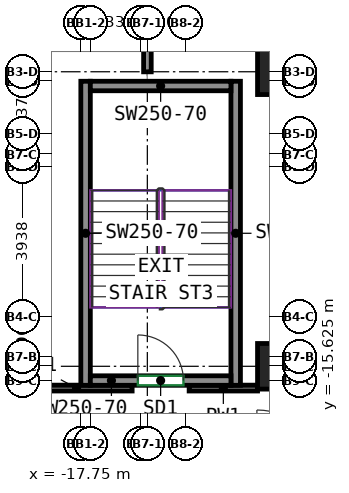
"""IFC4 building model, lengths in metres.
Left out: names, types, materials, properties, quantities, classifications, styles, units other than length and angle.
Written with IfcOpenShell. Run it as: python <this file> out.ifc"""

import sys

from ifc_helpers import new_model, si_unit, direction, frame, frame_2d, origin, origin_2d, place, context, subcontext, project, spatial, rectangle, extrude, source, transform, mapped, element, fill, save


model = new_model("IFC4")
c1 = context("Model", 3, precision=1e-05, world=origin(), true_north=direction((0.0, 1.0)))
c2 = subcontext(c1, "Body", "Model", "MODEL_VIEW")
j1 = project(units=[si_unit("LENGTHUNIT", "METRE"), si_unit("PLANEANGLEUNIT", "RADIAN")], contexts=[c1])
p1 = place(None, origin())
s1 = spatial("IfcSite", under=j1, at=p1, CompositionType="ELEMENT")
p2 = place(p1, origin())
s2 = spatial("IfcBuilding", under=s1, at=p2, CompositionType="ELEMENT")
p3 = place(p2, frame((0.0, 0.0, 100.6)))
s3 = spatial("IfcBuildingStorey", under=s2, at=p3, CompositionType="ELEMENT", Elevation=100.6)
m1 = source(origin(), c2, "Body", "SweptSolid", [
    extrude(rectangle(XDim=1.2, YDim=1.2, at=origin_2d()), origin(), (0.0, 0.0, 1.0), 3.72),
])
for number, where, z_axis, x_axis in (
    (1, (-12.5, -15.25, 0.0), (0.0, 0.0, 1.0), (1.0, 0.0, 0.0)),
    (2, (-12.5, -7.5, 0.0), (0.0, 0.0, 1.0), (1.0, 0.0, 0.0)),
):
    element("IfcColumn", number, at=place(p3, frame(where, z_axis=z_axis, x_axis=x_axis)), inside=s3, PredefinedType="COLUMN", context=c2, shape_type="MappedRepresentation", body=[
        mapped(m1, transform((0.0, 0.0, 0.0))),
    ])
m2 = source(origin(), c2, "Body", "SweptSolid", [
    extrude(rectangle(XDim=8.0, YDim=0.25, at=frame_2d((4.0, 0.0))), origin(), (0.0, 0.0, 1.0), 3.72),
])
for number, where, z_axis, x_axis in (
    (3, (-17.625, -15.75, 0.0), (0.0, 0.0, 1.0), (0.0, 1.0, 0.0)),
    (4, (-13.675, -15.75, 0.0), (0.0, 0.0, 1.0), (0.0, 1.0, 0.0)),
):
    element("IfcWall", number, at=place(p3, frame(where, z_axis=z_axis, x_axis=x_axis)), inside=s3, PredefinedType="SHEAR", context=c2, shape_type="MappedRepresentation", body=[
        mapped(m2, transform((0.0, 0.0, 0.0))),
    ])
m3 = source(origin(), c2, "Body", "SweptSolid", [
    extrude(rectangle(XDim=3.7, YDim=0.25, at=frame_2d((1.85, 0.0))), origin(), (0.0, 0.0, 1.0), 3.72),
])
p4 = place(p3, frame((-17.5, -15.625, 0.0), z_axis=(0.0, 0.0, 1.0), x_axis=(1.0, 0.0, 0.0)))
e5 = element("IfcWall", 5, at=p4, inside=s3, PredefinedType="SHEAR", context=c2, shape_type="MappedRepresentation", body=[
    mapped(m3, transform((0.0, 0.0, 0.0))),
])
p5 = place(p4, frame((1.25, 0.0, 0.0)))
e6 = element("IfcOpeningElement", 6, at=p5, cuts=e5, PredefinedType="OPENING", context=c2, shape_type="SweptSolid", body=[
    extrude(rectangle(XDim=1.2, YDim=2.1, at=frame_2d((0.6, 1.05))), frame((0.0, 0.135, 0.0), z_axis=(0.0, -1.0, 0.0), x_axis=(1.0, 0.0, 0.0)), (0.0, 0.0, 1.0), 0.27),
])
p6 = place(p3, frame((-17.5, -7.875, 0.0), z_axis=(0.0, 0.0, 1.0), x_axis=(1.0, 0.0, 0.0)))
e7 = element("IfcWall", 7, at=p6, inside=s3, PredefinedType="SHEAR", context=c2, shape_type="MappedRepresentation", body=[
    mapped(m3, transform((0.0, 0.0, 0.0))),
])
p7 = place(p3, frame((-14.9, -15.825, 0.0), z_axis=(0.0, 0.0, 1.0), x_axis=(1.0, 0.0, 0.0)))
e8 = element("IfcWall", 8, at=p7, inside=s3, PredefinedType="PARTITIONING", context=c2, shape_type="SweptSolid", body=[
    extrude(rectangle(XDim=1.8, YDim=0.15, at=frame_2d((0.9, 0.0))), origin(), (0.0, 0.0, 1.0), 3.72),
])
p8 = place(p3, frame((-19.325, -15.825, 0.0), z_axis=(0.0, 0.0, 1.0), x_axis=(1.0, 0.0, 0.0)))
e9 = element("IfcWall", 9, at=p8, inside=s3, PredefinedType="PARTITIONING", context=c2, shape_type="SweptSolid", body=[
    extrude(rectangle(XDim=2.925, YDim=0.15, at=frame_2d((1.462, 0.0))), origin(), (0.0, 0.0, 1.0), 3.72),
])
p9 = place(p3, frame((-15.998, -6.918, 0.0), z_axis=(0.0, 0.0, 1.0), x_axis=(0.0, -1.0, 0.0)))
e10 = element("IfcWall", 10, at=p9, inside=s3, PredefinedType="PARTITIONING", context=c2, shape_type="SweptSolid", body=[
    extrude(rectangle(XDim=0.584, YDim=0.2, at=frame_2d((0.292, 0.0))), origin(), (0.0, 0.0, 1.0), 3.72),
])
p10 = place(p5, origin())
e11 = element("IfcDoor", 11, at=p10, inside=s3, OperationType="DOUBLE_DOOR_SINGLE_SWING", PredefinedType="DOOR", context=c2, shape_type="SweptSolid", body=[
    extrude(rectangle(XDim=1.2, YDim=2.1, at=frame_2d((0.6, 1.05))), frame((0.0, 0.025, 0.0), z_axis=(0.0, -1.0, 0.0), x_axis=(1.0, 0.0, 0.0)), (0.0, 0.0, 1.0), 0.05),
])
fill(e6, e11)
save(model, sys.argv[1])
